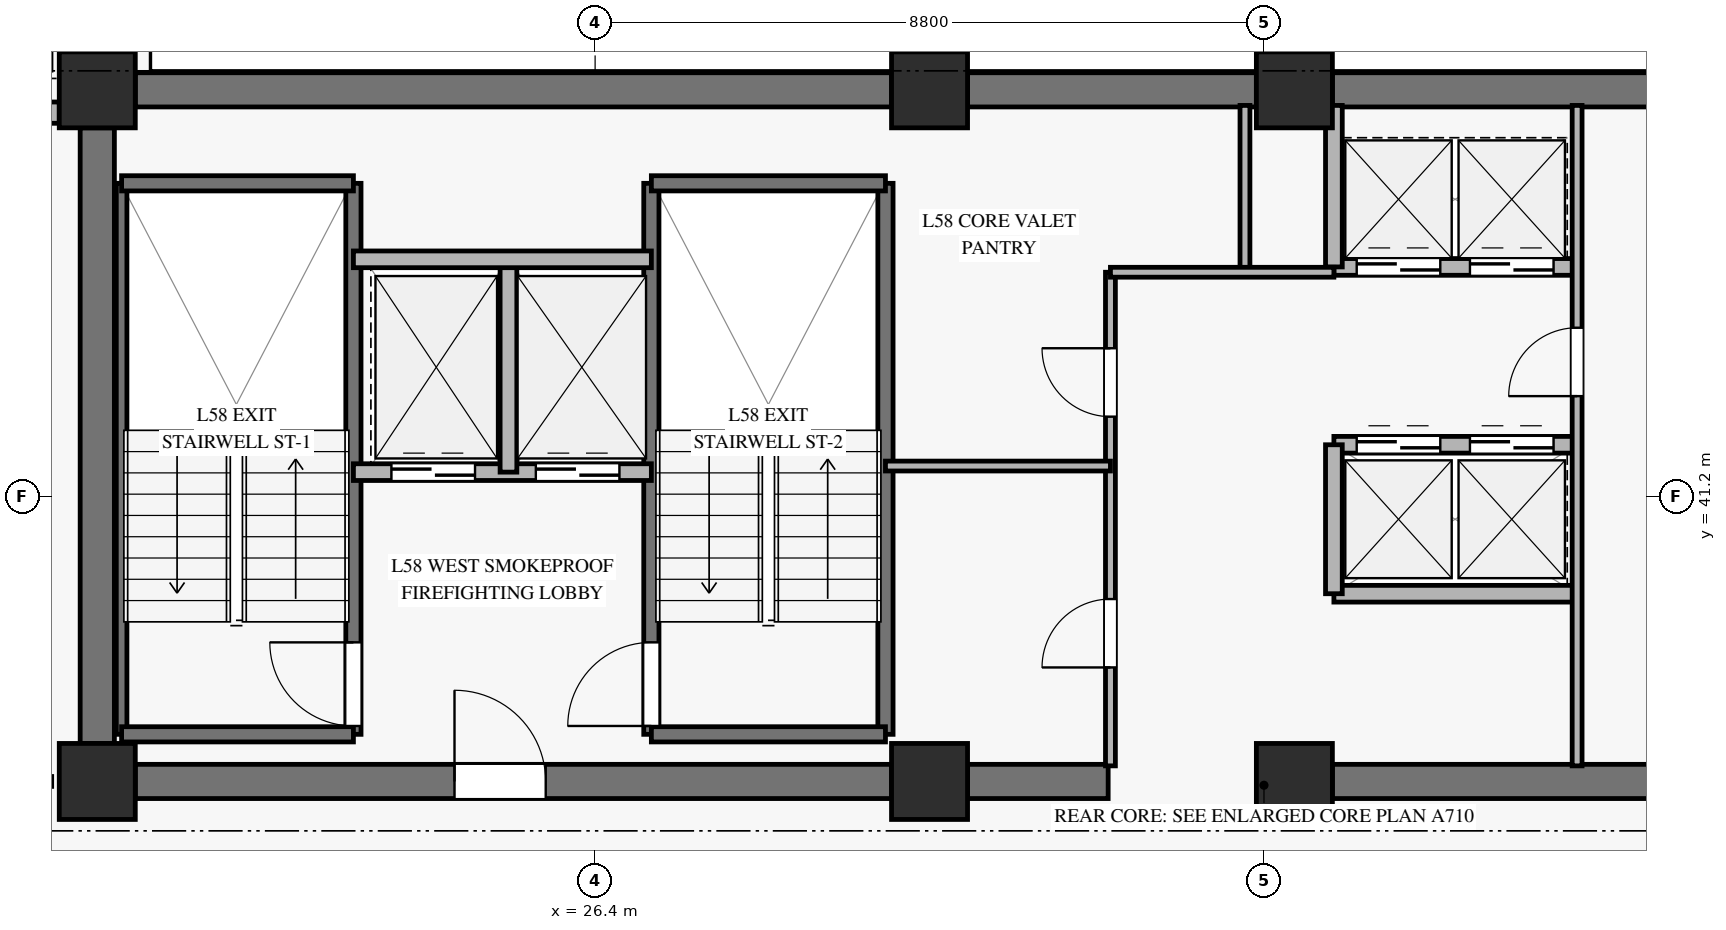
"""IFC4 building model, lengths in metres.
Left out: names, types, materials, properties, quantities, classifications, styles, units other than length and angle.
Written with IfcOpenShell. Run it as: python <this file> out.ifc"""

import sys

from ifc_helpers import new_model, si_unit, direction, frame, frame_2d, origin, origin_2d, place, context, subcontext, project, spatial, rectangle, extrude, source, transform, mapped, element, fill, save


model = new_model("IFC4")
c1 = context("Model", 3, precision=1e-05, world=origin(), true_north=direction((0.0, 1.0)))
c2 = subcontext(c1, "Body", "Model", "MODEL_VIEW")
j1 = project(units=[si_unit("LENGTHUNIT", "METRE"), si_unit("PLANEANGLEUNIT", "RADIAN")], contexts=[c1])
p1 = place(None, origin())
s1 = spatial("IfcSite", under=j1, at=p1, CompositionType="ELEMENT")
p2 = place(p1, origin())
s2 = spatial("IfcBuilding", under=s1, at=p2, CompositionType="ELEMENT")
p3 = place(p2, frame((0.0, 0.0, 230.4)))
s3 = spatial("IfcBuildingStorey", under=s2, at=p3, CompositionType="ELEMENT", Elevation=230.4)
m1 = source(origin(), c2, "Body", "SweptSolid", [
    extrude(rectangle(XDim=1.0, YDim=1.0, at=origin_2d()), origin(), (0.0, 0.0, 1.0), 3.185),
])
for number, where, z_axis, x_axis in (
    (1, (19.85, 37.45, 0.0), (0.0, 0.0, 1.0), (1.0, 0.0, 0.0)),
    (2, (19.85, 46.55, 0.0), (0.0, 0.0, 1.0), (1.0, 0.0, 0.0)),
    (3, (30.8, 37.45, 0.0), (0.0, 0.0, 1.0), (1.0, 0.0, 0.0)),
    (4, (30.8, 46.55, 0.0), (0.0, 0.0, 1.0), (1.0, 0.0, 0.0)),
    (5, (35.6, 37.45, 0.0), (0.0, 0.0, 1.0), (1.0, 0.0, 0.0)),
    (6, (35.6, 46.55, 0.0), (0.0, 0.0, 1.0), (1.0, 0.0, 0.0)),
):
    element("IfcColumn", number, at=place(p3, frame(where, z_axis=z_axis, x_axis=x_axis)), inside=s3, PredefinedType="PILASTER", context=c2, shape_type="MappedRepresentation", body=[
        mapped(m1, transform((0.0, 0.0, 0.0), x_axis=(1.0, 0.0, 0.0), y_axis=(0.0, 1.0, 0.0), z_axis=(0.0, 0.0, 1.0), scale=1.0)),
    ])
p4 = place(p3, frame((20.35, 46.55, 0.0), z_axis=(0.0, 0.0, 1.0), x_axis=(1.0, 0.0, 0.0)))
e7 = element("IfcWall", 7, at=p4, inside=s3, PredefinedType="SHEAR", context=c2, shape_type="SweptSolid", body=[
    extrude(rectangle(XDim=9.95, YDim=0.45, at=frame_2d((4.975, 0.0))), origin(), (0.0, 0.0, 1.0), 3.185),
])
p5 = place(p3, frame((31.3, 46.55, 0.0), z_axis=(0.0, 0.0, 1.0), x_axis=(1.0, 0.0, 0.0)))
e8 = element("IfcWall", 8, at=p5, inside=s3, PredefinedType="SHEAR", context=c2, shape_type="SweptSolid", body=[
    extrude(rectangle(XDim=3.8, YDim=0.45, at=frame_2d((1.9, 0.0))), origin(), (0.0, 0.0, 1.0), 3.185),
])
p6 = place(p3, frame((36.1, 46.55, 0.0), z_axis=(0.0, 0.0, 1.0), x_axis=(1.0, 0.0, 0.0)))
e9 = element("IfcWall", 9, at=p6, inside=s3, PredefinedType="SHEAR", context=c2, shape_type="SweptSolid", body=[
    extrude(rectangle(XDim=7.7, YDim=0.45, at=frame_2d((3.85, 0.0))), origin(), (0.0, 0.0, 1.0), 3.185),
])
p7 = place(p3, frame((20.35, 37.45, 0.0), z_axis=(0.0, 0.0, 1.0), x_axis=(1.0, 0.0, 0.0)))
e10 = element("IfcWall", 10, at=p7, inside=s3, PredefinedType="SHEAR", context=c2, shape_type="SweptSolid", body=[
    extrude(rectangle(XDim=9.95, YDim=0.45, at=frame_2d((4.975, 0.0))), origin(), (0.0, 0.0, 1.0), 3.185),
])
p8 = place(p7, frame((4.2, 0.0, 0.0)))
e11 = element("IfcOpeningElement", 11, at=p8, cuts=e10, PredefinedType="OPENING", context=c2, shape_type="SweptSolid", body=[
    extrude(rectangle(XDim=1.2, YDim=2.15, at=frame_2d((0.6, 1.075))), frame((0.0, 0.235, 0.0), z_axis=(0.0, -1.0, 0.0), x_axis=(1.0, 0.0, 0.0)), (0.0, 0.0, 1.0), 0.47),
])
p9 = place(p3, frame((31.3, 37.45, 0.0), z_axis=(0.0, 0.0, 1.0), x_axis=(1.0, 0.0, 0.0)))
e12 = element("IfcWall", 12, at=p9, inside=s3, PredefinedType="SHEAR", context=c2, shape_type="SweptSolid", body=[
    extrude(rectangle(XDim=1.85, YDim=0.45, at=frame_2d((0.925, 0.0))), origin(), (0.0, 0.0, 1.0), 3.185),
])
p10 = place(p3, frame((36.1, 37.45, 0.0), z_axis=(0.0, 0.0, 1.0), x_axis=(1.0, 0.0, 0.0)))
e13 = element("IfcWall", 13, at=p10, inside=s3, PredefinedType="SHEAR", context=c2, shape_type="SweptSolid", body=[
    extrude(rectangle(XDim=7.7, YDim=0.45, at=frame_2d((3.85, 0.0))), origin(), (0.0, 0.0, 1.0), 3.185),
])
p11 = place(p3, frame((19.85, 37.95, 0.0), z_axis=(0.0, 0.0, 1.0), x_axis=(0.0, 1.0, 0.0)))
e14 = element("IfcWall", 14, at=p11, inside=s3, PredefinedType="SHEAR", context=c2, shape_type="SweptSolid", body=[
    extrude(rectangle(XDim=8.1, YDim=0.45, at=frame_2d((4.05, 0.0))), origin(), (0.0, 0.0, 1.0), 3.185),
])
p12 = place(p3, frame((10.54, 46.25, 0.0), z_axis=(0.0, 0.0, 1.0), x_axis=(1.0, 0.0, 0.0)))
e15 = element("IfcWall", 15, at=p12, inside=s3, PredefinedType="SOLIDWALL", context=c2, shape_type="SweptSolid", body=[
    extrude(rectangle(XDim=8.81, YDim=0.28, at=frame_2d((4.405, 0.0))), origin(), (0.0, 0.0, 1.0), 2.815),
])
p13 = place(p12, frame((3.605, 0.0, 0.45)))
e16 = element("IfcOpeningElement", 16, at=p13, cuts=e15, PredefinedType="OPENING", context=c2, shape_type="SweptSolid", body=[
    extrude(rectangle(XDim=1.6, YDim=2.0, at=frame_2d((0.8, 1.0))), frame((0.0, 0.15, 0.0), z_axis=(0.0, -1.0, 0.0), x_axis=(1.0, 0.0, 0.0)), (0.0, 0.0, 1.0), 0.3),
])
p14 = place(p3, frame((20.17, 38.07, 0.0), z_axis=(0.0, 0.0, 1.0), x_axis=(0.0, 1.0, 0.0)))
e17 = element("IfcWall", 17, at=p14, inside=s3, PredefinedType="SOLIDWALL", context=c2, shape_type="SweptSolid", body=[
    extrude(rectangle(XDim=7.25, YDim=0.14, at=frame_2d((3.625, 0.0))), origin(), (0.0, 0.0, 1.0), 3.4),
])
p15 = place(p3, frame((23.22, 38.07, 0.0), z_axis=(0.0, 0.0, 1.0), x_axis=(0.0, 1.0, 0.0)))
e18 = element("IfcWall", 18, at=p15, inside=s3, PredefinedType="SOLIDWALL", context=c2, shape_type="SweptSolid", body=[
    extrude(rectangle(XDim=7.25, YDim=0.2, at=frame_2d((3.625, 0.0))), origin(), (0.0, 0.0, 1.0), 3.4),
])
p16 = place(p15, frame((0.11, 0.0, 0.0)))
e19 = element("IfcOpeningElement", 19, at=p16, cuts=e18, PredefinedType="OPENING", context=c2, shape_type="SweptSolid", body=[
    extrude(rectangle(XDim=1.1, YDim=2.15, at=frame_2d((0.55, 1.075))), frame((0.0, 0.11, 0.0), z_axis=(0.0, -1.0, 0.0), x_axis=(1.0, 0.0, 0.0)), (0.0, 0.0, 1.0), 0.22),
])
for number, where, z_axis, x_axis in (
    (20, (20.17, 45.32, 0.0), (0.0, 0.0, 1.0), (1.0, 0.0, 0.0)),
    (21, (20.17, 38.07, 0.0), (0.0, 0.0, 1.0), (1.0, 0.0, 0.0)),
):
    element("IfcWall", number, at=place(p3, frame(where, z_axis=z_axis, x_axis=x_axis)), inside=s3, PredefinedType="SOLIDWALL", context=c2, shape_type="SweptSolid", body=[
        extrude(rectangle(XDim=3.05, YDim=0.2, at=frame_2d((1.525, 0.0))), origin(), (0.0, 0.0, 1.0), 3.4),
    ])
p17 = place(p3, frame((27.14, 38.07, 0.0), z_axis=(0.0, 0.0, 1.0), x_axis=(0.0, 1.0, 0.0)))
e22 = element("IfcWall", 22, at=p17, inside=s3, PredefinedType="SOLIDWALL", context=c2, shape_type="SweptSolid", body=[
    extrude(rectangle(XDim=7.25, YDim=0.2, at=frame_2d((3.625, 0.0))), origin(), (0.0, 0.0, 1.0), 3.4),
])
p18 = place(p17, frame((0.11, 0.0, 0.0)))
e23 = element("IfcOpeningElement", 23, at=p18, cuts=e22, PredefinedType="OPENING", context=c2, shape_type="SweptSolid", body=[
    extrude(rectangle(XDim=1.1, YDim=2.15, at=frame_2d((0.55, 1.075))), frame((0.0, 0.11, 0.0), z_axis=(0.0, -1.0, 0.0), x_axis=(1.0, 0.0, 0.0)), (0.0, 0.0, 1.0), 0.22),
])
p19 = place(p3, frame((30.22, 38.07, 0.0), z_axis=(0.0, 0.0, 1.0), x_axis=(0.0, 1.0, 0.0)))
e24 = element("IfcWall", 24, at=p19, inside=s3, PredefinedType="SOLIDWALL", context=c2, shape_type="SweptSolid", body=[
    extrude(rectangle(XDim=7.25, YDim=0.2, at=frame_2d((3.625, 0.0))), origin(), (0.0, 0.0, 1.0), 3.4),
])
for number, where, z_axis, x_axis in (
    (25, (27.14, 45.32, 0.0), (0.0, 0.0, 1.0), (1.0, 0.0, 0.0)),
    (26, (27.14, 38.07, 0.0), (0.0, 0.0, 1.0), (1.0, 0.0, 0.0)),
):
    element("IfcWall", number, at=place(p3, frame(where, z_axis=z_axis, x_axis=x_axis)), inside=s3, PredefinedType="SOLIDWALL", context=c2, shape_type="SweptSolid", body=[
        extrude(rectangle(XDim=3.08, YDim=0.2, at=frame_2d((1.54, 0.0))), origin(), (0.0, 0.0, 1.0), 3.4),
    ])
p20 = place(p3, frame((23.22, 41.52, 0.0), z_axis=(0.0, 0.0, 1.0), x_axis=(1.0, 0.0, 0.0)))
e27 = element("IfcWall", 27, at=p20, inside=s3, PredefinedType="SOLIDWALL", context=c2, shape_type="SweptSolid", body=[
    extrude(rectangle(XDim=3.92, YDim=0.22, at=frame_2d((1.96, 0.0))), origin(), (0.0, 0.0, 1.0), 3.185),
])
p21 = place(p20, frame((0.5, 0.0, 0.0)))
e28 = element("IfcOpeningElement", 28, at=p21, cuts=e27, PredefinedType="OPENING", context=c2, shape_type="SweptSolid", body=[
    extrude(rectangle(XDim=1.1, YDim=2.2, at=frame_2d((0.55, 1.1))), frame((0.0, 0.12, 0.0), z_axis=(0.0, -1.0, 0.0), x_axis=(1.0, 0.0, 0.0)), (0.0, 0.0, 1.0), 0.24),
])
p22 = place(p20, frame((2.4, 0.0, 0.0)))
e29 = element("IfcOpeningElement", 29, at=p22, cuts=e27, PredefinedType="OPENING", context=c2, shape_type="SweptSolid", body=[
    extrude(rectangle(XDim=1.1, YDim=2.2, at=frame_2d((0.55, 1.1))), frame((0.0, 0.12, 0.0), z_axis=(0.0, -1.0, 0.0), x_axis=(1.0, 0.0, 0.0)), (0.0, 0.0, 1.0), 0.24),
])
p23 = place(p3, frame((25.26, 41.52, 0.0), z_axis=(0.0, 0.0, 1.0), x_axis=(0.0, 1.0, 0.0)))
e30 = element("IfcWall", 30, at=p23, inside=s3, PredefinedType="SOLIDWALL", context=c2, shape_type="SweptSolid", body=[
    extrude(rectangle(XDim=2.8, YDim=0.22, at=frame_2d((1.4, 0.0))), origin(), (0.0, 0.0, 1.0), 3.185),
])
p24 = place(p3, frame((23.22, 44.32, 0.0), z_axis=(0.0, 0.0, 1.0), x_axis=(1.0, 0.0, 0.0)))
e31 = element("IfcWall", 31, at=p24, inside=s3, PredefinedType="SOLIDWALL", context=c2, shape_type="SweptSolid", body=[
    extrude(rectangle(XDim=3.92, YDim=0.22, at=frame_2d((1.96, 0.0))), origin(), (0.0, 0.0, 1.0), 3.185),
])
p25 = place(p3, frame((36.12, 44.22, 0.0), z_axis=(0.0, 0.0, 1.0), x_axis=(1.0, 0.0, 0.0)))
e32 = element("IfcWall", 32, at=p25, inside=s3, PredefinedType="SOLIDWALL", context=c2, shape_type="SweptSolid", body=[
    extrude(rectangle(XDim=3.2, YDim=0.22, at=frame_2d((1.6, 0.0))), origin(), (0.0, 0.0, 1.0), 3.185),
])
p26 = place(p25, frame((0.3, 0.0, 0.0)))
e33 = element("IfcOpeningElement", 33, at=p26, cuts=e32, PredefinedType="OPENING", context=c2, shape_type="SweptSolid", body=[
    extrude(rectangle(XDim=1.1, YDim=2.2, at=frame_2d((0.55, 1.1))), frame((0.0, 0.12, 0.0), z_axis=(0.0, -1.0, 0.0), x_axis=(1.0, 0.0, 0.0)), (0.0, 0.0, 1.0), 0.24),
])
p27 = place(p25, frame((1.79, 0.0, 0.0)))
e34 = element("IfcOpeningElement", 34, at=p27, cuts=e32, PredefinedType="OPENING", context=c2, shape_type="SweptSolid", body=[
    extrude(rectangle(XDim=1.1, YDim=2.2, at=frame_2d((0.55, 1.1))), frame((0.0, 0.12, 0.0), z_axis=(0.0, -1.0, 0.0), x_axis=(1.0, 0.0, 0.0)), (0.0, 0.0, 1.0), 0.24),
])
p28 = place(p3, frame((36.12, 41.88, 0.0), z_axis=(0.0, 0.0, 1.0), x_axis=(1.0, 0.0, 0.0)))
e35 = element("IfcWall", 35, at=p28, inside=s3, PredefinedType="SOLIDWALL", context=c2, shape_type="SweptSolid", body=[
    extrude(rectangle(XDim=3.2, YDim=0.22, at=frame_2d((1.6, 0.0))), origin(), (0.0, 0.0, 1.0), 3.185),
])
p29 = place(p28, frame((0.3, 0.0, 0.0)))
e36 = element("IfcOpeningElement", 36, at=p29, cuts=e35, PredefinedType="OPENING", context=c2, shape_type="SweptSolid", body=[
    extrude(rectangle(XDim=1.1, YDim=2.2, at=frame_2d((0.55, 1.1))), frame((0.0, 0.12, 0.0), z_axis=(0.0, -1.0, 0.0), x_axis=(1.0, 0.0, 0.0)), (0.0, 0.0, 1.0), 0.24),
])
p30 = place(p28, frame((1.79, 0.0, 0.0)))
e37 = element("IfcOpeningElement", 37, at=p30, cuts=e35, PredefinedType="OPENING", context=c2, shape_type="SweptSolid", body=[
    extrude(rectangle(XDim=1.1, YDim=2.2, at=frame_2d((0.55, 1.1))), frame((0.0, 0.12, 0.0), z_axis=(0.0, -1.0, 0.0), x_axis=(1.0, 0.0, 0.0)), (0.0, 0.0, 1.0), 0.24),
])
p31 = place(p3, frame((36.12, 39.92, 0.0), z_axis=(0.0, 0.0, 1.0), x_axis=(1.0, 0.0, 0.0)))
e38 = element("IfcWall", 38, at=p31, inside=s3, PredefinedType="SOLIDWALL", context=c2, shape_type="SweptSolid", body=[
    extrude(rectangle(XDim=3.2, YDim=0.22, at=frame_2d((1.6, 0.0))), origin(), (0.0, 0.0, 1.0), 3.185),
])
p32 = place(p3, frame((36.12, 39.92, 0.0), z_axis=(0.0, 0.0, 1.0), x_axis=(0.0, 1.0, 0.0)))
e39 = element("IfcWall", 39, at=p32, inside=s3, PredefinedType="SOLIDWALL", context=c2, shape_type="SweptSolid", body=[
    extrude(rectangle(XDim=1.96, YDim=0.22, at=frame_2d((0.98, 0.0))), origin(), (0.0, 0.0, 1.0), 3.185),
])
p33 = place(p3, frame((36.12, 44.22, 0.0), z_axis=(0.0, 0.0, 1.0), x_axis=(0.0, 1.0, 0.0)))
e40 = element("IfcWall", 40, at=p33, inside=s3, PredefinedType="SOLIDWALL", context=c2, shape_type="SweptSolid", body=[
    extrude(rectangle(XDim=2.125, YDim=0.22, at=frame_2d((1.062, 0.0))), origin(), (0.0, 0.0, 1.0), 3.185),
])
p34 = place(p3, frame((33.18, 37.655, 0.0), z_axis=(0.0, 0.0, 1.0), x_axis=(0.0, 1.0, 0.0)))
e41 = element("IfcWall", 41, at=p34, inside=s3, PredefinedType="PARTITIONING", context=c2, shape_type="SweptSolid", body=[
    extrude(rectangle(XDim=6.495, YDim=0.13, at=frame_2d((3.248, 0.0))), origin(), (0.0, 0.0, 1.0), 2.27),
])
p35 = place(p34, frame((1.295, 0.0, 0.0)))
e42 = element("IfcOpeningElement", 42, at=p35, cuts=e41, PredefinedType="OPENING", context=c2, shape_type="SweptSolid", body=[
    extrude(rectangle(XDim=0.9, YDim=2.1, at=frame_2d((0.45, 1.05))), frame((0.0, 0.075, 0.0), z_axis=(0.0, -1.0, 0.0), x_axis=(1.0, 0.0, 0.0)), (0.0, 0.0, 1.0), 0.15),
])
p36 = place(p34, frame((4.595, 0.0, 0.0)))
e43 = element("IfcOpeningElement", 43, at=p36, cuts=e41, PredefinedType="OPENING", context=c2, shape_type="SweptSolid", body=[
    extrude(rectangle(XDim=0.9, YDim=2.1, at=frame_2d((0.45, 1.05))), frame((0.0, 0.075, 0.0), z_axis=(0.0, -1.0, 0.0), x_axis=(1.0, 0.0, 0.0)), (0.0, 0.0, 1.0), 0.15),
])
p37 = place(p3, frame((34.95, 44.15, 0.0), z_axis=(0.0, 0.0, 1.0), x_axis=(0.0, 1.0, 0.0)))
e44 = element("IfcWall", 44, at=p37, inside=s3, PredefinedType="PARTITIONING", context=c2, shape_type="SweptSolid", body=[
    extrude(rectangle(XDim=2.195, YDim=0.13, at=frame_2d((1.098, 0.0))), origin(), (0.0, 0.0, 1.0), 3.185),
])
p38 = place(p3, frame((33.18, 44.15, 0.0), z_axis=(0.0, 0.0, 1.0), x_axis=(1.0, 0.0, 0.0)))
e45 = element("IfcWall", 45, at=p38, inside=s3, PredefinedType="PARTITIONING", context=c2, shape_type="SweptSolid", body=[
    extrude(rectangle(XDim=2.94, YDim=0.13, at=frame_2d((1.47, 0.0))), origin(), (0.0, 0.0, 1.0), 2.47),
])
p39 = place(p3, frame((39.32, 37.655, 0.0), z_axis=(0.0, 0.0, 1.0), x_axis=(0.0, 1.0, 0.0)))
e46 = element("IfcWall", 46, at=p39, inside=s3, PredefinedType="PARTITIONING", context=c2, shape_type="SweptSolid", body=[
    extrude(rectangle(XDim=8.69, YDim=0.13, at=frame_2d((4.345, 0.0))), origin(), (0.0, 0.0, 1.0), 3.185),
])
p40 = place(p39, frame((4.865, 0.0, 0.0)))
e47 = element("IfcOpeningElement", 47, at=p40, cuts=e46, PredefinedType="OPENING", context=c2, shape_type="SweptSolid", body=[
    extrude(rectangle(XDim=0.9, YDim=2.1, at=frame_2d((0.45, 1.05))), frame((0.0, 0.075, 0.0), z_axis=(0.0, -1.0, 0.0), x_axis=(1.0, 0.0, 0.0)), (0.0, 0.0, 1.0), 0.15),
])
p41 = place(p3, frame((30.22, 41.6, 0.0), z_axis=(0.0, 0.0, 1.0), x_axis=(1.0, 0.0, 0.0)))
e48 = element("IfcWall", 48, at=p41, inside=s3, PredefinedType="PARTITIONING", context=c2, shape_type="SweptSolid", body=[
    extrude(rectangle(XDim=2.96, YDim=0.13, at=frame_2d((1.48, 0.0))), origin(), (0.0, 0.0, 1.0), 2.47),
])
m2 = source(origin(), c2, "Body", "SweptSolid", [
    extrude(rectangle(XDim=1.1, YDim=2.15, at=frame_2d((0.55, 1.075))), frame((0.0, 0.025, 0.0), z_axis=(0.0, -1.0, 0.0), x_axis=(1.0, 0.0, 0.0)), (0.0, 0.0, 1.0), 0.05),
])
p42 = place(p16, origin())
e49 = element("IfcDoor", 49, at=p42, inside=s3, OperationType="SINGLE_SWING_RIGHT", PredefinedType="DOOR", context=c2, shape_type="MappedRepresentation", body=[
    mapped(m2, transform((0.0, 0.0, 0.0), x_axis=(1.0, 0.0, 0.0), y_axis=(0.0, 1.0, 0.0), z_axis=(0.0, 0.0, 1.0), scale=1.0)),
])
fill(e19, e49)
p43 = place(p18, origin())
e50 = element("IfcDoor", 50, at=p43, inside=s3, OperationType="SINGLE_SWING_LEFT", PredefinedType="DOOR", context=c2, shape_type="MappedRepresentation", body=[
    mapped(m2, transform((0.0, 0.0, 0.0), x_axis=(1.0, 0.0, 0.0), y_axis=(0.0, 1.0, 0.0), z_axis=(0.0, 0.0, 1.0), scale=1.0)),
])
fill(e23, e50)
m3 = source(origin(), c2, "Body", "SweptSolid", [
    extrude(rectangle(XDim=1.1, YDim=2.2, at=frame_2d((0.55, 1.1))), frame((0.0, 0.025, 0.0), z_axis=(0.0, -1.0, 0.0), x_axis=(1.0, 0.0, 0.0)), (0.0, 0.0, 1.0), 0.05),
])
p44 = place(p21, origin())
e51 = element("IfcDoor", 51, at=p44, inside=s3, OperationType="SLIDING_TO_LEFT", PredefinedType="DOOR", context=c2, shape_type="MappedRepresentation", body=[
    mapped(m3, transform((0.0, 0.0, 0.0), x_axis=(1.0, 0.0, 0.0), y_axis=(0.0, 1.0, 0.0), z_axis=(0.0, 0.0, 1.0), scale=1.0)),
])
fill(e28, e51)
p45 = place(p22, origin())
e52 = element("IfcDoor", 52, at=p45, inside=s3, OperationType="SLIDING_TO_LEFT", PredefinedType="DOOR", context=c2, shape_type="MappedRepresentation", body=[
    mapped(m3, transform((0.0, 0.0, 0.0), x_axis=(1.0, 0.0, 0.0), y_axis=(0.0, 1.0, 0.0), z_axis=(0.0, 0.0, 1.0), scale=1.0)),
])
fill(e29, e52)
m4 = source(origin(), c2, "Body", "SweptSolid", [
    extrude(rectangle(XDim=1.2, YDim=2.15, at=frame_2d((0.6, 1.075))), frame((0.0, 0.025, 0.0), z_axis=(0.0, -1.0, 0.0), x_axis=(1.0, 0.0, 0.0)), (0.0, 0.0, 1.0), 0.05),
])
p46 = place(p8, origin())
e53 = element("IfcDoor", 53, at=p46, inside=s3, OperationType="SINGLE_SWING_LEFT", PredefinedType="DOOR", context=c2, shape_type="MappedRepresentation", body=[
    mapped(m4, transform((0.0, 0.0, 0.0), x_axis=(1.0, 0.0, 0.0), y_axis=(0.0, 1.0, 0.0), z_axis=(0.0, 0.0, 1.0), scale=1.0)),
])
fill(e11, e53)
p47 = place(p26, origin())
e54 = element("IfcDoor", 54, at=p47, inside=s3, OperationType="SLIDING_TO_LEFT", PredefinedType="DOOR", context=c2, shape_type="MappedRepresentation", body=[
    mapped(m3, transform((0.0, 0.0, 0.0), x_axis=(1.0, 0.0, 0.0), y_axis=(0.0, 1.0, 0.0), z_axis=(0.0, 0.0, 1.0), scale=1.0)),
])
fill(e33, e54)
p48 = place(p27, origin())
e55 = element("IfcDoor", 55, at=p48, inside=s3, OperationType="SLIDING_TO_LEFT", PredefinedType="DOOR", context=c2, shape_type="MappedRepresentation", body=[
    mapped(m3, transform((0.0, 0.0, 0.0), x_axis=(1.0, 0.0, 0.0), y_axis=(0.0, 1.0, 0.0), z_axis=(0.0, 0.0, 1.0), scale=1.0)),
])
fill(e34, e55)
p49 = place(p29, origin())
e56 = element("IfcDoor", 56, at=p49, inside=s3, OperationType="SLIDING_TO_LEFT", PredefinedType="DOOR", context=c2, shape_type="MappedRepresentation", body=[
    mapped(m3, transform((0.0, 0.0, 0.0), x_axis=(1.0, 0.0, 0.0), y_axis=(0.0, 1.0, 0.0), z_axis=(0.0, 0.0, 1.0), scale=1.0)),
])
fill(e36, e56)
p50 = place(p30, origin())
e57 = element("IfcDoor", 57, at=p50, inside=s3, OperationType="SLIDING_TO_LEFT", PredefinedType="DOOR", context=c2, shape_type="MappedRepresentation", body=[
    mapped(m3, transform((0.0, 0.0, 0.0), x_axis=(1.0, 0.0, 0.0), y_axis=(0.0, 1.0, 0.0), z_axis=(0.0, 0.0, 1.0), scale=1.0)),
])
fill(e37, e57)
m5 = source(origin(), c2, "Body", "SweptSolid", [
    extrude(rectangle(XDim=0.9, YDim=2.1, at=frame_2d((0.45, 1.05))), frame((0.0, 0.025, 0.0), z_axis=(0.0, -1.0, 0.0), x_axis=(1.0, 0.0, 0.0)), (0.0, 0.0, 1.0), 0.05),
])
p51 = place(p35, origin())
e58 = element("IfcDoor", 58, at=p51, inside=s3, OperationType="SINGLE_SWING_LEFT", PredefinedType="DOOR", context=c2, shape_type="MappedRepresentation", body=[
    mapped(m5, transform((0.0, 0.0, 0.0), x_axis=(1.0, 0.0, 0.0), y_axis=(0.0, 1.0, 0.0), z_axis=(0.0, 0.0, 1.0), scale=1.0)),
])
fill(e42, e58)
p52 = place(p36, origin())
e59 = element("IfcDoor", 59, at=p52, inside=s3, OperationType="SINGLE_SWING_RIGHT", PredefinedType="DOOR", context=c2, shape_type="MappedRepresentation", body=[
    mapped(m5, transform((0.0, 0.0, 0.0), x_axis=(1.0, 0.0, 0.0), y_axis=(0.0, 1.0, 0.0), z_axis=(0.0, 0.0, 1.0), scale=1.0)),
])
fill(e43, e59)
p53 = place(p40, origin())
e60 = element("IfcDoor", 60, at=p53, inside=s3, OperationType="SINGLE_SWING_LEFT", PredefinedType="DOOR", context=c2, shape_type="MappedRepresentation", body=[
    mapped(m5, transform((0.0, 0.0, 0.0), x_axis=(1.0, 0.0, 0.0), y_axis=(0.0, 1.0, 0.0), z_axis=(0.0, 0.0, 1.0), scale=1.0)),
])
fill(e47, e60)
save(model, sys.argv[1])
